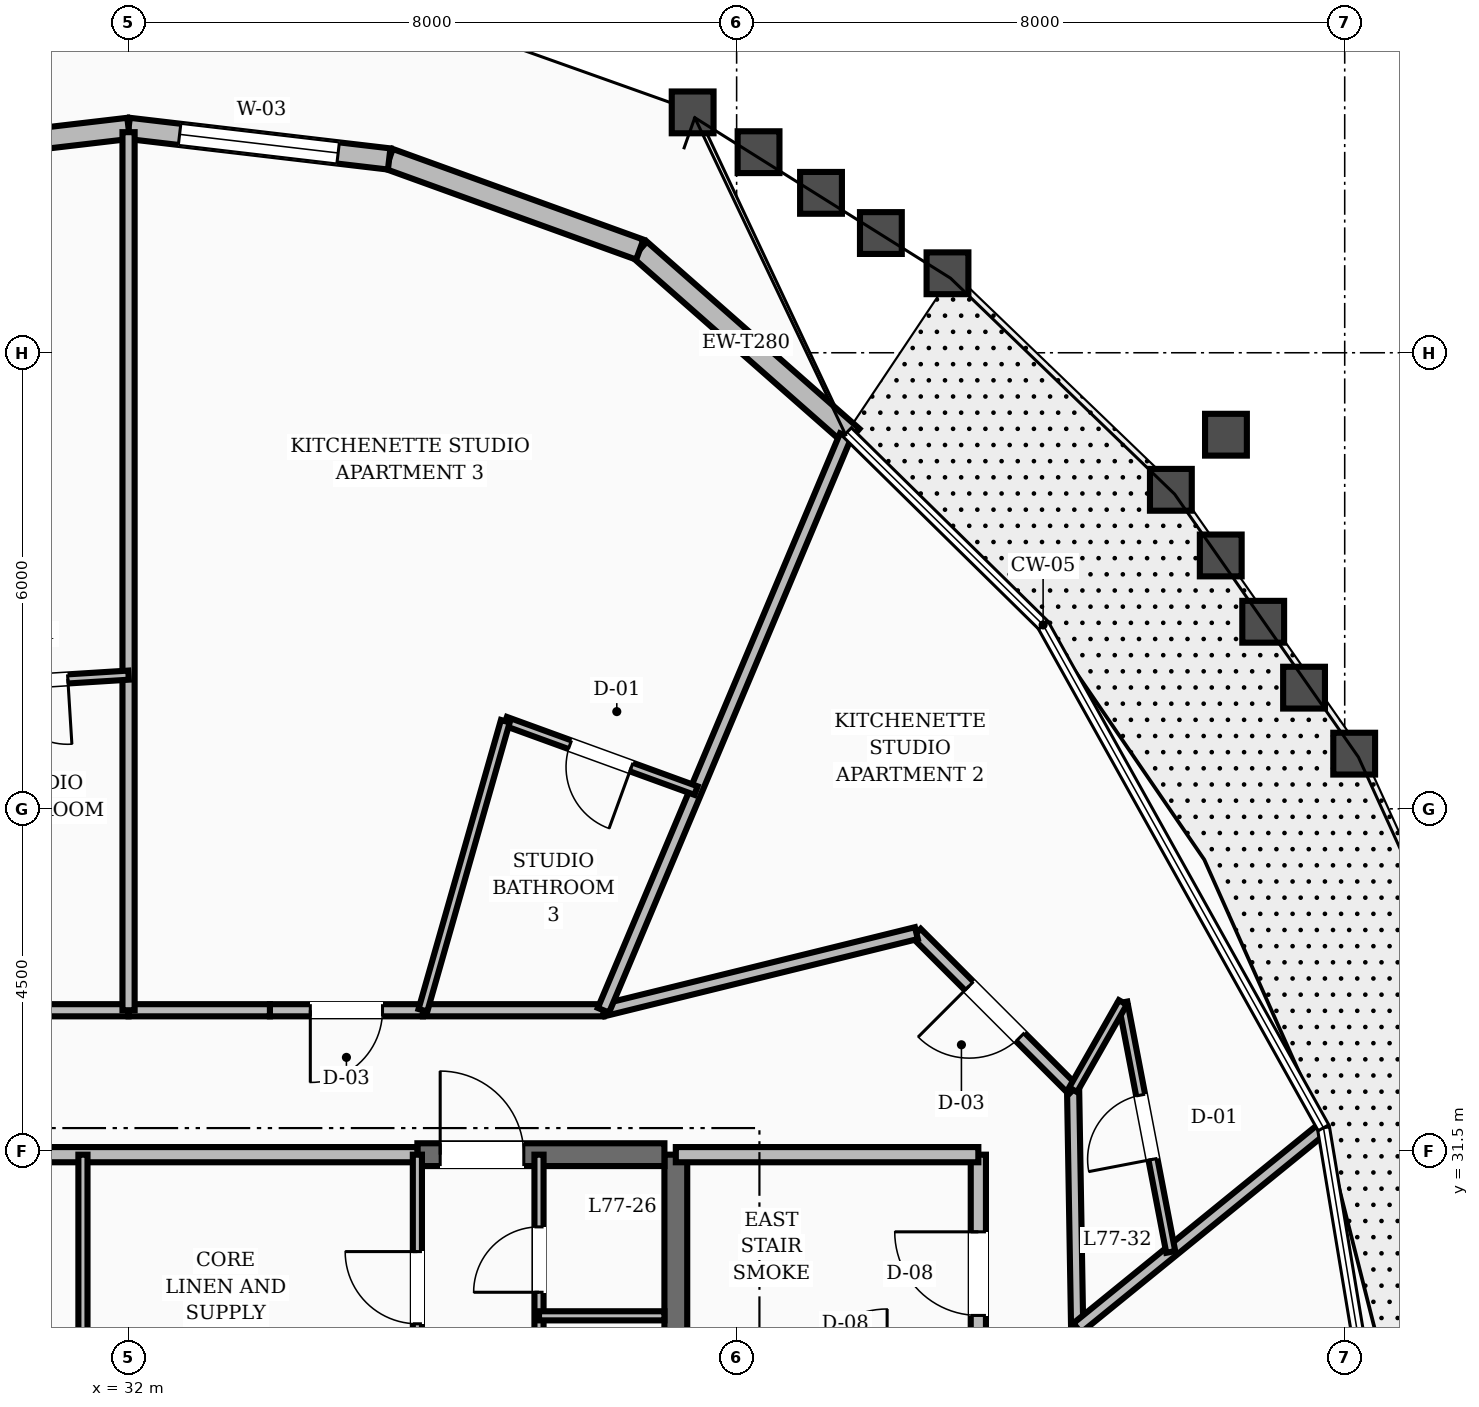
"""IFC4 building model, lengths in metres.
Left out: names, types, materials, properties, quantities, classifications, styles, units other than length and angle.
Written with IfcOpenShell. Run it as: python <this file> out.ifc"""

import sys

from ifc_helpers import new_model, si_unit, direction, frame, frame_2d, origin, place, context, subcontext, project, spatial, rectangle, extrude, element, fill, save


model = new_model("IFC4")
c1 = context("Model", 3, precision=1e-05, world=origin(), true_north=direction((0.0, 1.0)))
c2 = subcontext(c1, "Body", "Model", "MODEL_VIEW")
j1 = project(units=[si_unit("LENGTHUNIT", "METRE"), si_unit("PLANEANGLEUNIT", "RADIAN")], contexts=[c1])
p1 = place(None, origin())
s1 = spatial("IfcSite", under=j1, at=p1, CompositionType="ELEMENT")
p2 = place(p1, origin())
s2 = spatial("IfcBuilding", under=s1, at=p2, CompositionType="ELEMENT")
p3 = place(p2, frame((0.0, 0.0, 294.0)))
s3 = spatial("IfcBuildingStorey", under=s2, at=p3, CompositionType="ELEMENT", Elevation=294.0)
p4 = place(p3, frame((39.2, 25.15, 0.0), z_axis=(0.0, 0.0, 1.0), x_axis=(0.0, 1.0, 0.0)))
e1 = element("IfcWall", 1, at=p4, inside=s3, PredefinedType="SHEAR", context=c2, shape_type="SweptSolid", body=[
    extrude(rectangle(XDim=6.3, YDim=0.3, at=frame_2d((3.15, 0.0))), origin(), (0.0, 0.0, 1.0), 3.6),
])
p5 = place(p3, frame((35.8, 31.45, 0.0), z_axis=(0.0, 0.0, 1.0), x_axis=(1.0, 0.0, 0.0)))
e2 = element("IfcWall", 2, at=p5, inside=s3, PredefinedType="SHEAR", context=c2, shape_type="SweptSolid", body=[
    extrude(rectangle(XDim=3.25, YDim=0.3, at=frame_2d((1.625, 0.0))), origin(), (0.0, 0.0, 1.0), 3.6),
])
p6 = place(p5, frame((0.3, 0.0, 0.0)))
e3 = element("IfcOpeningElement", 3, at=p6, cuts=e2, PredefinedType="OPENING", context=c2, shape_type="SweptSolid", body=[
    extrude(rectangle(XDim=1.1, YDim=2.1, at=frame_2d((0.55, 1.05))), frame((0.0, 0.16, 0.0), z_axis=(0.0, -1.0, 0.0), x_axis=(1.0, 0.0, 0.0)), (0.0, 0.0, 1.0), 0.32),
])
p7 = place(p3, frame((41.523, 40.895, 0.0), z_axis=(0.0, 0.0, 1.0), x_axis=(-0.75049902536, 0.660871555549, 0.0)))
e4 = element("IfcWall", 4, at=p7, inside=s3, PredefinedType="STANDARD", context=c2, shape_type="SweptSolid", body=[
    extrude(rectangle(XDim=3.726, YDim=0.28, at=frame_2d((1.863, 0.0))), origin(), (0.0, 0.0, 1.0), 2.82),
])
p8 = place(p3, frame((38.726, 43.357, 0.0), z_axis=(0.0, 0.0, 1.0), x_axis=(-0.940393758193, 0.340087605703, 0.0)))
e5 = element("IfcWall", 5, at=p8, inside=s3, PredefinedType="STANDARD", context=c2, shape_type="SweptSolid", body=[
    extrude(rectangle(XDim=3.506, YDim=0.28, at=frame_2d((1.753, 0.0))), origin(), (0.0, 0.0, 1.0), 2.82),
])
p9 = place(p3, frame((35.429, 44.55, 0.0), z_axis=(0.0, 0.0, 1.0), x_axis=(-0.993178090084, 0.116607381314, 0.0)))
e6 = element("IfcWall", 6, at=p9, inside=s3, PredefinedType="STANDARD", context=c2, shape_type="SweptSolid", body=[
    extrude(rectangle(XDim=3.452, YDim=0.28, at=frame_2d((1.726, 0.0))), origin(), (0.0, 0.0, 1.0), 2.82),
])
p10 = place(p9, frame((0.676, 0.0, 0.8)))
e7 = element("IfcOpeningElement", 7, at=p10, cuts=e6, PredefinedType="OPENING", context=c2, shape_type="SweptSolid", body=[
    extrude(rectangle(XDim=2.1, YDim=1.65, at=frame_2d((1.05, 0.825))), frame((0.0, 0.15, 0.0), z_axis=(0.0, -1.0, 0.0), x_axis=(1.0, 0.0, 0.0)), (0.0, 0.0, 1.0), 0.3),
])
p11 = place(p3, frame((32.0, 44.952, 0.0), z_axis=(0.0, 0.0, 1.0), x_axis=(-0.993178090084, -0.116607381314, 0.0)))
e8 = element("IfcWall", 8, at=p11, inside=s3, PredefinedType="STANDARD", context=c2, shape_type="SweptSolid", body=[
    extrude(rectangle(XDim=3.452, YDim=0.28, at=frame_2d((1.726, 0.0))), origin(), (0.0, 0.0, 1.0), 2.82),
])
p12 = place(p3, frame((43.18, 28.32, 0.0), z_axis=(0.0, 0.0, 1.0), x_axis=(0.0, 1.0, 0.0)))
e9 = element("IfcWall", 9, at=p12, inside=s3, PredefinedType="SOLIDWALL", context=c2, shape_type="SweptSolid", body=[
    extrude(rectangle(XDim=3.13, YDim=0.2, at=frame_2d((1.565, 0.0))), origin(), (0.0, 0.0, 1.0), 2.81),
])
p13 = place(p12, frame((1.015, 0.0, 0.0)))
e10 = element("IfcOpeningElement", 10, at=p13, cuts=e9, PredefinedType="OPENING", context=c2, shape_type="SweptSolid", body=[
    extrude(rectangle(XDim=1.1, YDim=2.1, at=frame_2d((0.55, 1.05))), frame((0.0, 0.11, 0.0), z_axis=(0.0, -1.0, 0.0), x_axis=(1.0, 0.0, 0.0)), (0.0, 0.0, 1.0), 0.22),
])
p14 = place(p3, frame((39.2, 31.45, 0.0), z_axis=(0.0, 0.0, 1.0), x_axis=(1.0, 0.0, 0.0)))
e11 = element("IfcWall", 11, at=p14, inside=s3, PredefinedType="SOLIDWALL", context=c2, shape_type="SweptSolid", body=[
    extrude(rectangle(XDim=3.98, YDim=0.2, at=frame_2d((1.99, 0.0))), origin(), (0.0, 0.0, 1.0), 2.81),
])
p15 = place(p3, frame((28.2, 31.45, 0.0), z_axis=(0.0, 0.0, 1.0), x_axis=(1.0, 0.0, 0.0)))
e12 = element("IfcWall", 12, at=p15, inside=s3, PredefinedType="SOLIDWALL", context=c2, shape_type="SweptSolid", body=[
    extrude(rectangle(XDim=7.6, YDim=0.2, at=frame_2d((3.8, 0.0))), origin(), (0.0, 0.0, 1.0), 2.81),
])
p16 = place(p15, frame((1.0, 0.0, 0.0)))
e13 = element("IfcOpeningElement", 13, at=p16, cuts=e12, PredefinedType="OPENING", context=c2, shape_type="SweptSolid", body=[
    extrude(rectangle(XDim=0.95, YDim=2.1, at=frame_2d((0.475, 1.05))), frame((0.0, 0.11, 0.0), z_axis=(0.0, -1.0, 0.0), x_axis=(1.0, 0.0, 0.0)), (0.0, 0.0, 1.0), 0.22),
])
p17 = place(p3, frame((35.8, 27.95, 0.0), z_axis=(0.0, 0.0, 1.0), x_axis=(0.0, 1.0, 0.0)))
e14 = element("IfcWall", 14, at=p17, inside=s3, PredefinedType="PARTITIONING", context=c2, shape_type="SweptSolid", body=[
    extrude(rectangle(XDim=3.5, YDim=0.12, at=frame_2d((1.75, 0.0))), origin(), (0.0, 0.0, 1.0), 2.81),
])
p18 = place(p17, frame((1.275, 0.0, 0.0)))
e15 = element("IfcOpeningElement", 15, at=p18, cuts=e14, PredefinedType="OPENING", context=c2, shape_type="SweptSolid", body=[
    extrude(rectangle(XDim=0.95, YDim=2.1, at=frame_2d((0.475, 1.05))), frame((0.0, 0.07, 0.0), z_axis=(0.0, -1.0, 0.0), x_axis=(1.0, 0.0, 0.0)), (0.0, 0.0, 1.0), 0.14),
])
p19 = place(p3, frame((31.4, 27.95, 0.0), z_axis=(0.0, 0.0, 1.0), x_axis=(0.0, 1.0, 0.0)))
e16 = element("IfcWall", 16, at=p19, inside=s3, PredefinedType="PARTITIONING", context=c2, shape_type="SweptSolid", body=[
    extrude(rectangle(XDim=3.5, YDim=0.12, at=frame_2d((1.75, 0.0))), origin(), (0.0, 0.0, 1.0), 2.81),
])
p20 = place(p3, frame((37.4, 25.25, 0.0), z_axis=(0.0, 0.0, 1.0), x_axis=(0.0, 1.0, 0.0)))
e17 = element("IfcWall", 17, at=p20, inside=s3, PredefinedType="PARTITIONING", context=c2, shape_type="SweptSolid", body=[
    extrude(rectangle(XDim=6.2, YDim=0.12, at=frame_2d((3.1, 0.0))), origin(), (0.0, 0.0, 1.0), 2.81),
])
p21 = place(p20, frame((0.44, 0.0, 0.0)))
e18 = element("IfcOpeningElement", 18, at=p21, cuts=e17, PredefinedType="OPENING", context=c2, shape_type="SweptSolid", body=[
    extrude(rectangle(XDim=0.86, YDim=2.1, at=frame_2d((0.43, 1.05))), frame((0.0, 0.07, 0.0), z_axis=(0.0, -1.0, 0.0), x_axis=(1.0, 0.0, 0.0)), (0.0, 0.0, 1.0), 0.14),
])
p22 = place(p20, frame((2.37, 0.0, 0.0)))
e19 = element("IfcOpeningElement", 19, at=p22, cuts=e17, PredefinedType="OPENING", context=c2, shape_type="SweptSolid", body=[
    extrude(rectangle(XDim=0.86, YDim=2.1, at=frame_2d((0.43, 1.05))), frame((0.0, 0.07, 0.0), z_axis=(0.0, -1.0, 0.0), x_axis=(1.0, 0.0, 0.0)), (0.0, 0.0, 1.0), 0.14),
])
p23 = place(p20, frame((4.39, 0.0, 0.0)))
e20 = element("IfcOpeningElement", 20, at=p23, cuts=e17, PredefinedType="OPENING", context=c2, shape_type="SweptSolid", body=[
    extrude(rectangle(XDim=0.86, YDim=2.1, at=frame_2d((0.43, 1.05))), frame((0.0, 0.07, 0.0), z_axis=(0.0, -1.0, 0.0), x_axis=(1.0, 0.0, 0.0)), (0.0, 0.0, 1.0), 0.14),
])
p24 = place(p3, frame((37.4, 29.33, 0.0), z_axis=(0.0, 0.0, 1.0), x_axis=(1.0, 0.0, 0.0)))
e21 = element("IfcWall", 21, at=p24, inside=s3, PredefinedType="PARTITIONING", context=c2, shape_type="SweptSolid", body=[
    extrude(rectangle(XDim=1.65, YDim=0.12, at=frame_2d((0.825, 0.0))), origin(), (0.0, 0.0, 1.0), 2.81),
])
p25 = place(p3, frame((44.48, 29.169, 0.0), z_axis=(0.0, 0.0, 1.0), x_axis=(-0.016981035134, 0.999855811828, 0.0)))
e22 = element("IfcWall", 22, at=p25, inside=s3, PredefinedType="SOLIDWALL", context=c2, shape_type="SweptSolid", body=[
    extrude(rectangle(XDim=3.134, YDim=0.16, at=frame_2d((1.567, 0.0))), origin(), (0.0, 0.0, 1.0), 2.81),
])
p26 = place(p3, frame((44.427, 32.303, 0.0), z_axis=(0.0, 0.0, 1.0), x_axis=(-0.707106781187, 0.707106781187, 0.0)))
e23 = element("IfcWall", 23, at=p26, inside=s3, PredefinedType="SOLIDWALL", context=c2, shape_type="SweptSolid", body=[
    extrude(rectangle(XDim=2.916, YDim=0.16, at=frame_2d((1.458, 0.0))), origin(), (0.0, 0.0, 1.0), 2.81),
])
p27 = place(p26, frame((0.983, 0.0, 0.0)))
e24 = element("IfcOpeningElement", 24, at=p27, cuts=e23, PredefinedType="OPENING", context=c2, shape_type="SweptSolid", body=[
    extrude(rectangle(XDim=0.95, YDim=2.1, at=frame_2d((0.475, 1.05))), frame((0.0, 0.09, 0.0), z_axis=(0.0, -1.0, 0.0), x_axis=(1.0, 0.0, 0.0)), (0.0, 0.0, 1.0), 0.18),
])
p28 = place(p3, frame((42.365, 34.365, 0.0), z_axis=(0.0, 0.0, 1.0), x_axis=(-0.970939799552, -0.239323850978, 0.0)))
e25 = element("IfcWall", 25, at=p28, inside=s3, PredefinedType="SOLIDWALL", context=c2, shape_type="SweptSolid", body=[
    extrude(rectangle(XDim=4.241, YDim=0.16, at=frame_2d((2.12, 0.0))), origin(), (0.0, 0.0, 1.0), 2.81),
])
p29 = place(p3, frame((38.248, 33.35, 0.0), z_axis=(0.0, 0.0, 1.0), x_axis=(-1.0, 0.0, 0.0)))
e26 = element("IfcWall", 26, at=p29, inside=s3, PredefinedType="SOLIDWALL", context=c2, shape_type="SweptSolid", body=[
    extrude(rectangle(XDim=2.375, YDim=0.16, at=frame_2d((1.188, 0.0))), origin(), (0.0, 0.0, 1.0), 2.81),
])
p30 = place(p3, frame((35.873, 33.35, 0.0), z_axis=(0.0, 0.0, 1.0), x_axis=(-1.0, 0.0, 0.0)))
e27 = element("IfcWall", 27, at=p30, inside=s3, PredefinedType="SOLIDWALL", context=c2, shape_type="SweptSolid", body=[
    extrude(rectangle(XDim=2.013, YDim=0.16, at=frame_2d((1.006, 0.0))), origin(), (0.0, 0.0, 1.0), 2.81),
])
p31 = place(p30, frame((0.531, 0.0, 0.0)))
e28 = element("IfcOpeningElement", 28, at=p31, cuts=e27, PredefinedType="OPENING", context=c2, shape_type="SweptSolid", body=[
    extrude(rectangle(XDim=0.95, YDim=2.1, at=frame_2d((0.475, 1.05))), frame((0.0, 0.09, 0.0), z_axis=(0.0, -1.0, 0.0), x_axis=(1.0, 0.0, 0.0)), (0.0, 0.0, 1.0), 0.18),
])
for number, where, z_axis, x_axis in (
    (29, (33.86, 33.35, 0.0), (0.0, 0.0, 1.0), (-1.0, 0.0, 0.0)),
    (30, (32.0, 33.35, 0.0), (0.0, 0.0, 1.0), (-1.0, 0.0, 0.0)),
):
    element("IfcWall", number, at=place(p3, frame(where, z_axis=z_axis, x_axis=x_axis)), inside=s3, PredefinedType="SOLIDWALL", context=c2, shape_type="SweptSolid", body=[
        extrude(rectangle(XDim=1.86, YDim=0.16, at=frame_2d((0.93, 0.0))), origin(), (0.0, 0.0, 1.0), 2.81),
    ])
p32 = place(p3, frame((44.48, 29.169, 0.0), z_axis=(0.0, 0.0, 1.0), x_axis=(0.775967385679, 0.630773030783, 0.0)))
e31 = element("IfcWall", 31, at=p32, inside=s3, PredefinedType="SOLIDWALL", context=c2, shape_type="SweptSolid", body=[
    extrude(rectangle(XDim=4.126, YDim=0.16, at=frame_2d((2.063, 0.0))), origin(), (0.0, 0.0, 1.0), 2.81),
])
p33 = place(p3, frame((45.711, 30.17, 0.0), z_axis=(0.0, 0.0, 1.0), x_axis=(-0.18865234905, 0.982043935472, 0.0)))
e32 = element("IfcWall", 32, at=p33, inside=s3, PredefinedType="PARTITIONING", context=c2, shape_type="SweptSolid", body=[
    extrude(rectangle(XDim=3.343, YDim=0.12, at=frame_2d((1.671, 0.0))), origin(), (0.0, 0.0, 1.0), 2.81),
])
p34 = place(p33, frame((1.241, 0.0, 0.0)))
e33 = element("IfcOpeningElement", 33, at=p34, cuts=e32, PredefinedType="OPENING", context=c2, shape_type="SweptSolid", body=[
    extrude(rectangle(XDim=0.86, YDim=2.1, at=frame_2d((0.43, 1.05))), frame((0.0, 0.07, 0.0), z_axis=(0.0, -1.0, 0.0), x_axis=(1.0, 0.0, 0.0)), (0.0, 0.0, 1.0), 0.14),
])
p35 = place(p3, frame((44.427, 32.303, 0.0), z_axis=(0.0, 0.0, 1.0), x_axis=(0.494408865021, 0.869229471537, 0.0)))
e34 = element("IfcWall", 34, at=p35, inside=s3, PredefinedType="PARTITIONING", context=c2, shape_type="SweptSolid", body=[
    extrude(rectangle(XDim=1.323, YDim=0.12, at=frame_2d((0.662, 0.0))), origin(), (0.0, 0.0, 1.0), 2.81),
])
p36 = place(p3, frame((38.248, 33.35, 0.0), z_axis=(0.0, 0.0, 1.0), x_axis=(0.388445474078, 0.921471710726, 0.0)))
e35 = element("IfcWall", 35, at=p36, inside=s3, PredefinedType="SOLIDWALL", context=c2, shape_type="SweptSolid", body=[
    extrude(rectangle(XDim=8.203, YDim=0.16, at=frame_2d((4.102, 0.0))), origin(), (0.0, 0.0, 1.0), 2.81),
])
p37 = place(p3, frame((39.466, 36.24, 0.0), z_axis=(0.0, 0.0, 1.0), x_axis=(-0.939756036214, 0.341845860585, 0.0)))
e36 = element("IfcWall", 36, at=p37, inside=s3, PredefinedType="PARTITIONING", context=c2, shape_type="SweptSolid", body=[
    extrude(rectangle(XDim=2.67, YDim=0.12, at=frame_2d((1.335, 0.0))), origin(), (0.0, 0.0, 1.0), 2.81),
])
p38 = place(p37, frame((0.905, 0.0, 0.0)))
e37 = element("IfcOpeningElement", 37, at=p38, cuts=e36, PredefinedType="OPENING", context=c2, shape_type="SweptSolid", body=[
    extrude(rectangle(XDim=0.86, YDim=2.1, at=frame_2d((0.43, 1.05))), frame((0.0, 0.07, 0.0), z_axis=(0.0, -1.0, 0.0), x_axis=(1.0, 0.0, 0.0)), (0.0, 0.0, 1.0), 0.14),
])
p39 = place(p3, frame((35.873, 33.35, 0.0), z_axis=(0.0, 0.0, 1.0), x_axis=(0.274207327835, 0.961670599198, 0.0)))
e38 = element("IfcWall", 38, at=p39, inside=s3, PredefinedType="PARTITIONING", context=c2, shape_type="SweptSolid", body=[
    extrude(rectangle(XDim=3.954, YDim=0.12, at=frame_2d((1.977, 0.0))), origin(), (0.0, 0.0, 1.0), 2.81),
])
p40 = place(p3, frame((32.0, 33.35, 0.0), z_axis=(0.0, 0.0, 1.0), x_axis=(0.0, 1.0, 0.0)))
e39 = element("IfcWall", 39, at=p40, inside=s3, PredefinedType="SOLIDWALL", context=c2, shape_type="SweptSolid", body=[
    extrude(rectangle(XDim=11.552, YDim=0.16, at=frame_2d((5.776, 0.0))), origin(), (0.0, 0.0, 1.0), 2.81),
])
p41 = place(p3, frame((32.0, 37.759, 0.0), z_axis=(0.0, 0.0, 1.0), x_axis=(-0.998063372487, -0.062205341407, 0.0)))
e40 = element("IfcWall", 40, at=p41, inside=s3, PredefinedType="PARTITIONING", context=c2, shape_type="SweptSolid", body=[
    extrude(rectangle(XDim=2.461, YDim=0.12, at=frame_2d((1.23, 0.0))), origin(), (0.0, 0.0, 1.0), 2.81),
])
p42 = place(p41, frame((0.801, 0.0, 0.0)))
e41 = element("IfcOpeningElement", 41, at=p42, cuts=e40, PredefinedType="OPENING", context=c2, shape_type="SweptSolid", body=[
    extrude(rectangle(XDim=0.86, YDim=2.1, at=frame_2d((0.43, 1.05))), frame((0.0, 0.07, 0.0), z_axis=(0.0, -1.0, 0.0), x_axis=(1.0, 0.0, 0.0)), (0.0, 0.0, 1.0), 0.14),
])
p43 = place(p10, origin())
e42 = element("IfcWindow", 42, at=p43, inside=s3, PartitioningType="SINGLE_PANEL", PredefinedType="WINDOW", context=c2, shape_type="SweptSolid", body=[
    extrude(rectangle(XDim=2.1, YDim=1.65, at=frame_2d((1.05, 0.825))), frame((0.0, 0.03, 0.0), z_axis=(0.0, -1.0, 0.0), x_axis=(1.0, 0.0, 0.0)), (0.0, 0.0, 1.0), 0.06),
])
fill(e7, e42)
p44 = place(p13, origin())
e43 = element("IfcDoor", 43, at=p44, inside=s3, OperationType="SINGLE_SWING_RIGHT", PredefinedType="DOOR", context=c2, shape_type="SweptSolid", body=[
    extrude(rectangle(XDim=1.1, YDim=2.1, at=frame_2d((0.55, 1.05))), frame((0.0, 0.025, 0.0), z_axis=(0.0, -1.0, 0.0), x_axis=(1.0, 0.0, 0.0)), (0.0, 0.0, 1.0), 0.05),
])
fill(e10, e43)
p45 = place(p6, origin())
e44 = element("IfcDoor", 44, at=p45, inside=s3, OperationType="SINGLE_SWING_LEFT", PredefinedType="DOOR", context=c2, shape_type="SweptSolid", body=[
    extrude(rectangle(XDim=1.1, YDim=2.1, at=frame_2d((0.55, 1.05))), frame((0.0, 0.025, 0.0), z_axis=(0.0, -1.0, 0.0), x_axis=(1.0, 0.0, 0.0)), (0.0, 0.0, 1.0), 0.05),
])
fill(e3, e44)
p46 = place(p18, origin())
e45 = element("IfcDoor", 45, at=p46, inside=s3, OperationType="SINGLE_SWING_RIGHT", PredefinedType="DOOR", context=c2, shape_type="SweptSolid", body=[
    extrude(rectangle(XDim=0.95, YDim=2.1, at=frame_2d((0.475, 1.05))), frame((0.0, 0.025, 0.0), z_axis=(0.0, -1.0, 0.0), x_axis=(1.0, 0.0, 0.0)), (0.0, 0.0, 1.0), 0.05),
])
fill(e15, e45)
p47 = place(p23, origin())
e46 = element("IfcDoor", 46, at=p47, inside=s3, OperationType="SINGLE_SWING_LEFT", PredefinedType="DOOR", context=c2, shape_type="SweptSolid", body=[
    extrude(rectangle(XDim=0.86, YDim=2.1, at=frame_2d((0.43, 1.05))), frame((0.0, 0.025, 0.0), z_axis=(0.0, -1.0, 0.0), x_axis=(1.0, 0.0, 0.0)), (0.0, 0.0, 1.0), 0.05),
])
fill(e20, e46)
p48 = place(p34, origin())
e47 = element("IfcDoor", 47, at=p48, inside=s3, OperationType="SINGLE_SWING_LEFT", PredefinedType="DOOR", context=c2, shape_type="SweptSolid", body=[
    extrude(rectangle(XDim=0.86, YDim=2.1, at=frame_2d((0.43, 1.05))), frame((0.0, 0.025, 0.0), z_axis=(0.0, -1.0, 0.0), x_axis=(1.0, 0.0, 0.0)), (0.0, 0.0, 1.0), 0.05),
])
fill(e33, e47)
p49 = place(p27, origin())
e48 = element("IfcDoor", 48, at=p49, inside=s3, OperationType="SINGLE_SWING_RIGHT", PredefinedType="DOOR", context=c2, shape_type="SweptSolid", body=[
    extrude(rectangle(XDim=0.95, YDim=2.1, at=frame_2d((0.475, 1.05))), frame((0.0, 0.025, 0.0), z_axis=(0.0, -1.0, 0.0), x_axis=(1.0, 0.0, 0.0)), (0.0, 0.0, 1.0), 0.05),
])
fill(e24, e48)
p50 = place(p38, origin())
e49 = element("IfcDoor", 49, at=p50, inside=s3, OperationType="SINGLE_SWING_LEFT", PredefinedType="DOOR", context=c2, shape_type="SweptSolid", body=[
    extrude(rectangle(XDim=0.86, YDim=2.1, at=frame_2d((0.43, 1.05))), frame((0.0, 0.025, 0.0), z_axis=(0.0, -1.0, 0.0), x_axis=(1.0, 0.0, 0.0)), (0.0, 0.0, 1.0), 0.05),
])
fill(e37, e49)
p51 = place(p31, origin())
e50 = element("IfcDoor", 50, at=p51, inside=s3, OperationType="SINGLE_SWING_RIGHT", PredefinedType="DOOR", context=c2, shape_type="SweptSolid", body=[
    extrude(rectangle(XDim=0.95, YDim=2.1, at=frame_2d((0.475, 1.05))), frame((0.0, 0.025, 0.0), z_axis=(0.0, -1.0, 0.0), x_axis=(1.0, 0.0, 0.0)), (0.0, 0.0, 1.0), 0.05),
])
fill(e28, e50)
p52 = place(p42, origin())
e51 = element("IfcDoor", 51, at=p52, inside=s3, OperationType="SINGLE_SWING_LEFT", PredefinedType="DOOR", context=c2, shape_type="SweptSolid", body=[
    extrude(rectangle(XDim=0.86, YDim=2.1, at=frame_2d((0.43, 1.05))), frame((0.0, 0.025, 0.0), z_axis=(0.0, -1.0, 0.0), x_axis=(1.0, 0.0, 0.0)), (0.0, 0.0, 1.0), 0.05),
])
fill(e41, e51)
save(model, sys.argv[1])
